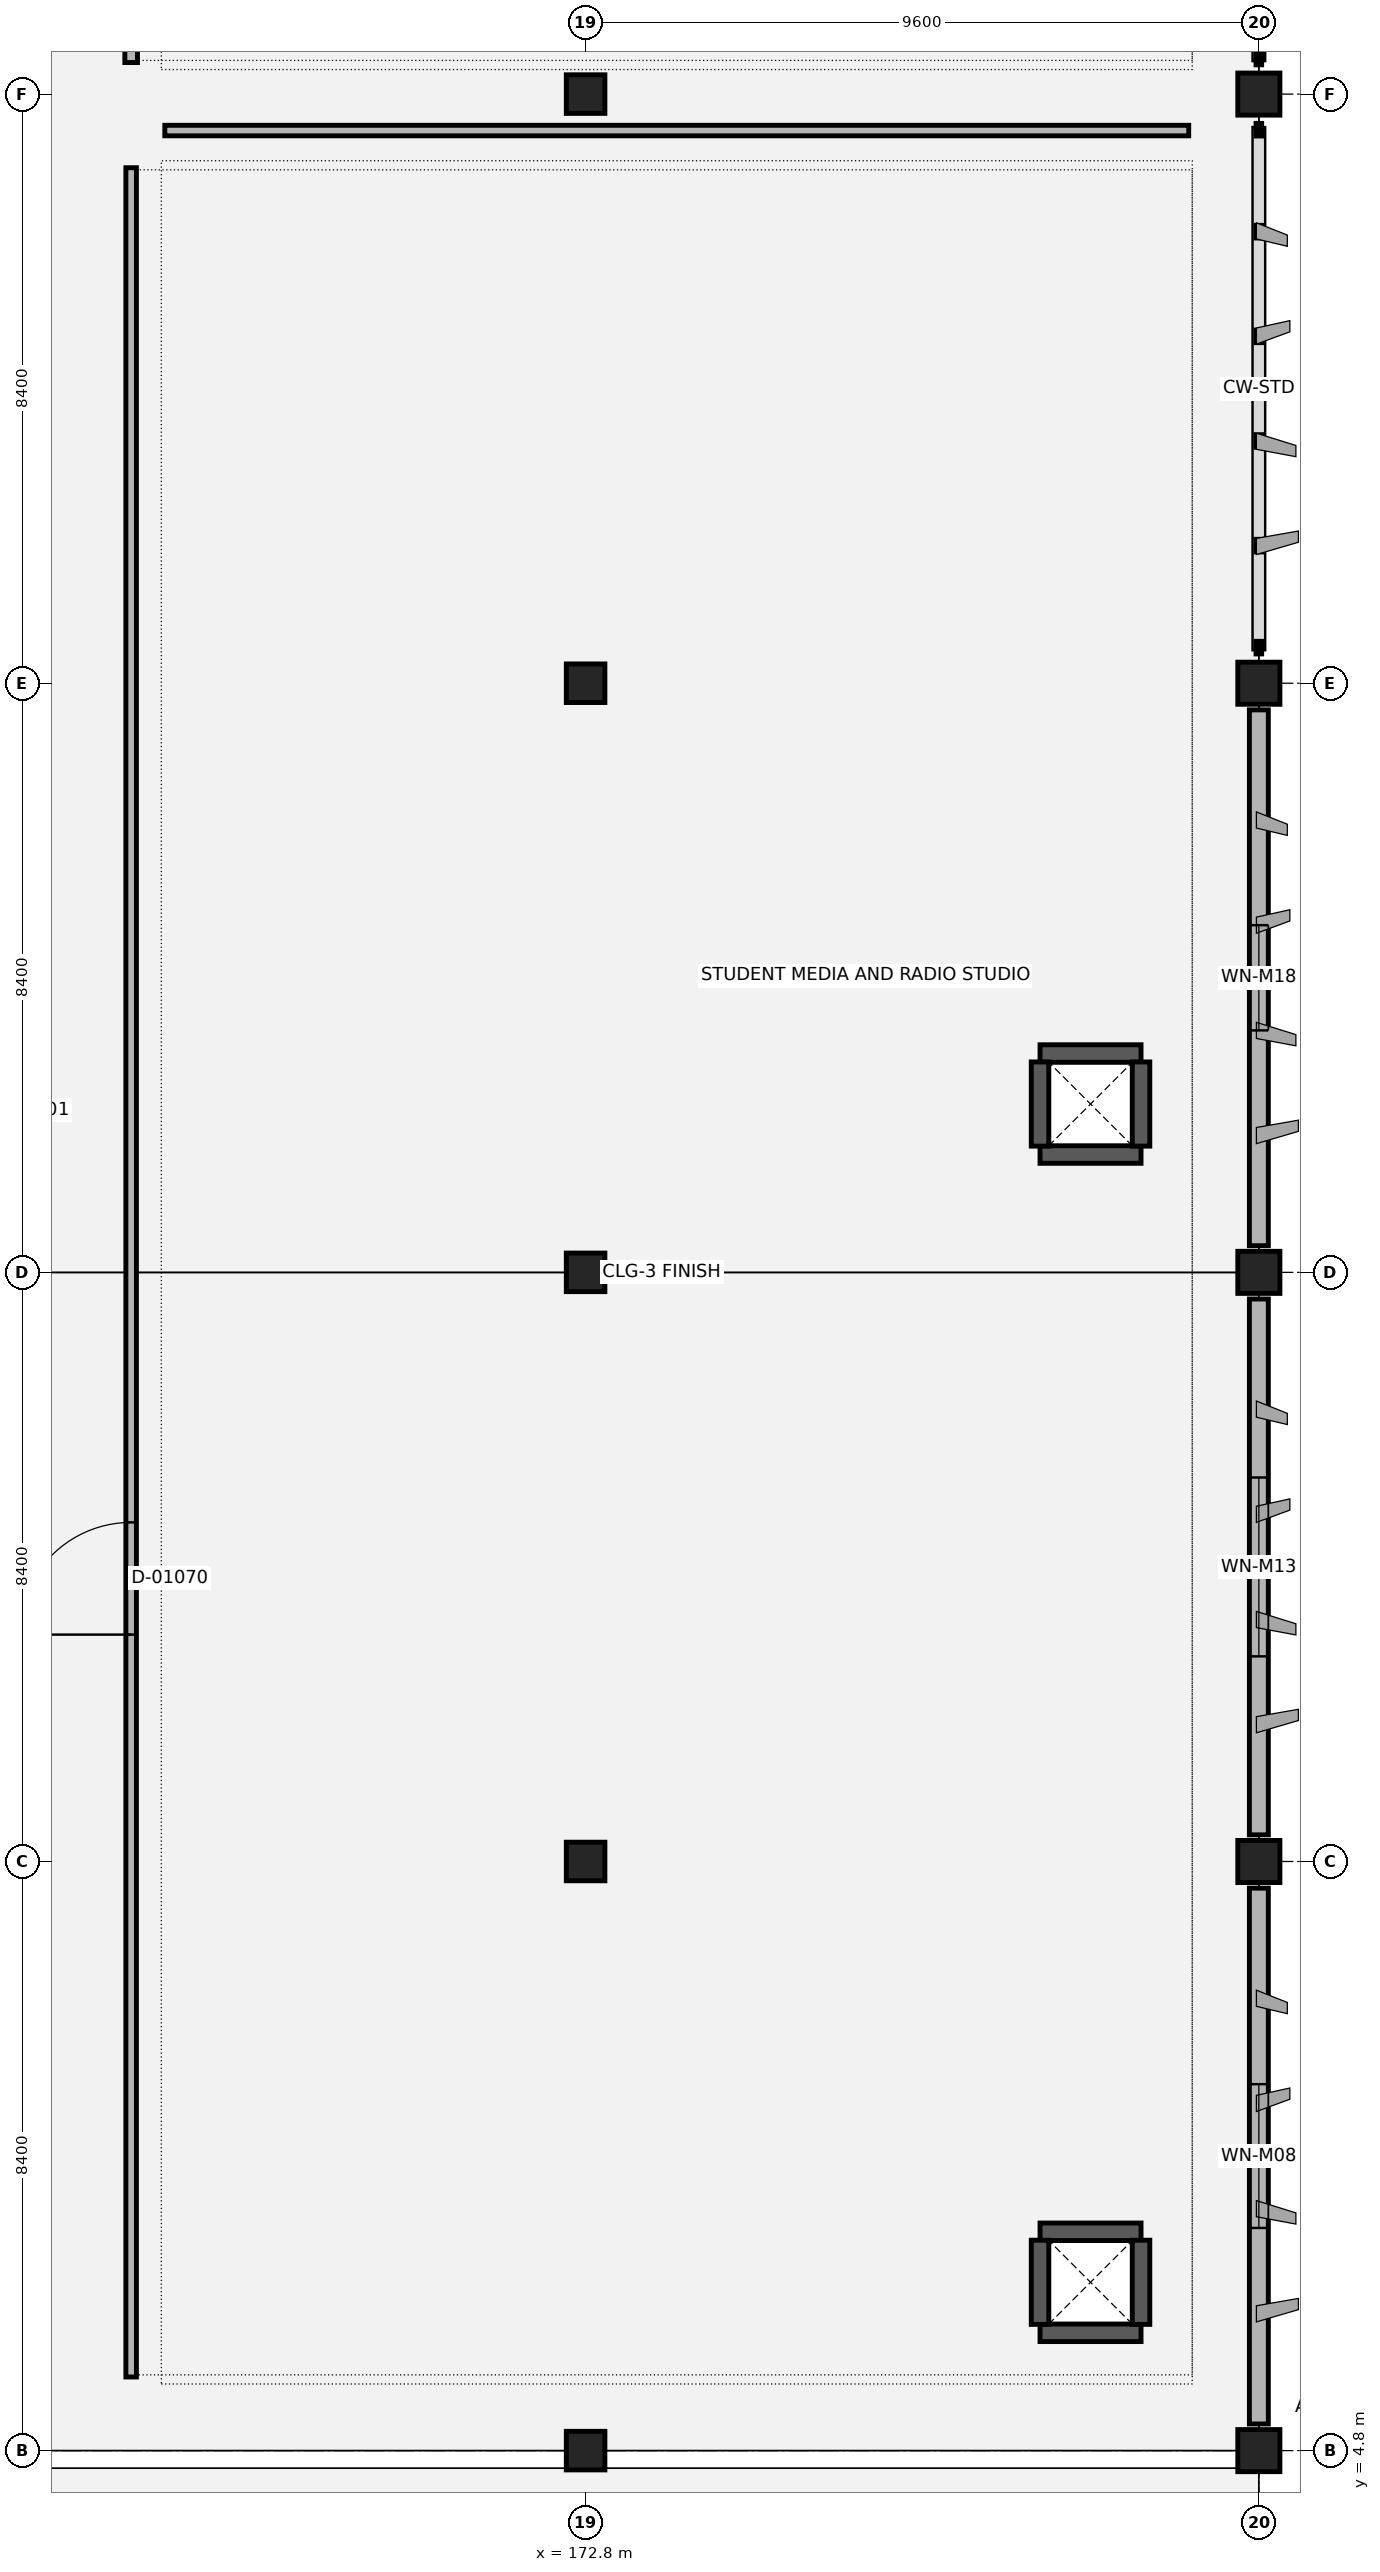
"""IFC4 building model, lengths in metres.
Left out: names, types, materials, properties, quantities, classifications, styles, units other than length and angle.
Written with IfcOpenShell. Run it as: python <this file> out.ifc"""

import sys

from ifc_helpers import new_model, si_unit, direction, frame, frame_2d, origin, origin_2d, place, context, subcontext, project, spatial, rectangle, extrude, element, fill, save


model = new_model("IFC4")
c1 = context("Model", 3, precision=1e-05, world=origin(), true_north=direction((0.0, 1.0)))
c2 = subcontext(c1, "Body", "Model", "MODEL_VIEW")
j1 = project(units=[si_unit("LENGTHUNIT", "METRE"), si_unit("PLANEANGLEUNIT", "RADIAN")], contexts=[c1])
p1 = place(None, origin())
s1 = spatial("IfcSite", under=j1, at=p1, CompositionType="ELEMENT")
p2 = place(p1, origin())
s2 = spatial("IfcBuilding", under=s1, at=p2, CompositionType="ELEMENT")
p3 = place(p2, frame((0.0, 0.0, 5.4)))
s3 = spatial("IfcBuildingStorey", under=s2, at=p3, CompositionType="ELEMENT", Elevation=5.4)
for number, where, z_axis, x_axis in (
    (1, (172.8, 4.8, 0.0), (0.0, 0.0, 1.0), (1.0, 0.0, 0.0)),
    (2, (172.8, 13.2, 0.0), (0.0, 0.0, 1.0), (1.0, 0.0, 0.0)),
    (3, (172.8, 21.6, 0.0), (0.0, 0.0, 1.0), (1.0, 0.0, 0.0)),
    (4, (172.8, 30.0, 0.0), (0.0, 0.0, 1.0), (1.0, 0.0, 0.0)),
    (5, (172.8, 38.4, 0.0), (0.0, 0.0, 1.0), (1.0, 0.0, 0.0)),
):
    element("IfcColumn", number, at=place(p3, frame(where, z_axis=z_axis, x_axis=x_axis)), inside=s3, PredefinedType="COLUMN", context=c2, shape_type="SweptSolid", body=[
        extrude(rectangle(XDim=0.55, YDim=0.55, at=origin_2d()), origin(), (0.0, 0.0, 1.0), 4.8),
    ])
for number, where, z_axis, x_axis in (
    (6, (182.4, 4.8, 0.0), (0.0, 0.0, 1.0), (1.0, 0.0, 0.0)),
    (7, (182.4, 13.2, 0.0), (0.0, 0.0, 1.0), (1.0, 0.0, 0.0)),
    (8, (182.4, 21.6, 0.0), (0.0, 0.0, 1.0), (1.0, 0.0, 0.0)),
    (9, (182.4, 30.0, 0.0), (0.0, 0.0, 1.0), (1.0, 0.0, 0.0)),
    (10, (182.4, 38.4, 0.0), (0.0, 0.0, 1.0), (1.0, 0.0, 0.0)),
):
    element("IfcColumn", number, at=place(p3, frame(where, z_axis=z_axis, x_axis=x_axis)), inside=s3, PredefinedType="COLUMN", context=c2, shape_type="SweptSolid", body=[
        extrude(rectangle(XDim=0.6, YDim=0.6, at=origin_2d()), origin(), (0.0, 0.0, 1.0), 4.8),
    ])
for number, where, z_axis, x_axis in (
    (11, (179.28, 6.48, 0.0), (0.0, 0.0, 1.0), (1.0, 0.0, 0.0)),
    (12, (179.28, 7.92, 0.0), (0.0, 0.0, 1.0), (1.0, 0.0, 0.0)),
):
    element("IfcWall", number, at=place(p3, frame(where, z_axis=z_axis, x_axis=x_axis)), inside=s3, PredefinedType="SHEAR", context=c2, shape_type="SweptSolid", body=[
        extrude(rectangle(XDim=1.44, YDim=0.25, at=frame_2d((0.72, 0.0))), origin(), (0.0, 0.0, 1.0), 3.6),
    ])
for number, where, z_axis, x_axis in (
    (13, (179.28, 6.6, 0.0), (0.0, 0.0, 1.0), (0.0, 1.0, 0.0)),
    (14, (180.72, 6.6, 0.0), (0.0, 0.0, 1.0), (0.0, 1.0, 0.0)),
):
    element("IfcWall", number, at=place(p3, frame(where, z_axis=z_axis, x_axis=x_axis)), inside=s3, PredefinedType="SHEAR", context=c2, shape_type="SweptSolid", body=[
        extrude(rectangle(XDim=1.2, YDim=0.25, at=frame_2d((0.6, 0.0))), origin(), (0.0, 0.0, 1.0), 3.6),
    ])
for number, where, z_axis, x_axis in (
    (15, (179.28, 23.28, 0.0), (0.0, 0.0, 1.0), (1.0, 0.0, 0.0)),
    (16, (179.28, 24.72, 0.0), (0.0, 0.0, 1.0), (1.0, 0.0, 0.0)),
):
    element("IfcWall", number, at=place(p3, frame(where, z_axis=z_axis, x_axis=x_axis)), inside=s3, PredefinedType="SHEAR", context=c2, shape_type="SweptSolid", body=[
        extrude(rectangle(XDim=1.44, YDim=0.25, at=frame_2d((0.72, 0.0))), origin(), (0.0, 0.0, 1.0), 3.6),
    ])
for number, where, z_axis, x_axis in (
    (17, (179.28, 23.4, 0.0), (0.0, 0.0, 1.0), (0.0, 1.0, 0.0)),
    (18, (180.72, 23.4, 0.0), (0.0, 0.0, 1.0), (0.0, 1.0, 0.0)),
):
    element("IfcWall", number, at=place(p3, frame(where, z_axis=z_axis, x_axis=x_axis)), inside=s3, PredefinedType="SHEAR", context=c2, shape_type="SweptSolid", body=[
        extrude(rectangle(XDim=1.2, YDim=0.25, at=frame_2d((0.6, 0.0))), origin(), (0.0, 0.0, 1.0), 3.6),
    ])
p4 = place(p3, frame((182.4, 5.18, 0.0), z_axis=(0.0, 0.0, 1.0), x_axis=(0.0, 1.0, 0.0)))
e19 = element("IfcWall", 19, at=p4, inside=s3, PredefinedType="SOLIDWALL", context=c2, shape_type="SweptSolid", body=[
    extrude(rectangle(XDim=7.64, YDim=0.27, at=frame_2d((3.82, 0.0))), origin(), (0.0, 0.0, 1.0), 3.28),
])
p5 = place(p4, frame((2.795, 0.0, 0.9)))
e20 = element("IfcOpeningElement", 20, at=p5, cuts=e19, PredefinedType="OPENING", context=c2, shape_type="SweptSolid", body=[
    extrude(rectangle(XDim=2.05, YDim=1.6, at=frame_2d((1.025, 0.8))), frame((0.0, 0.145, 0.0), z_axis=(0.0, -1.0, 0.0), x_axis=(1.0, 0.0, 0.0)), (0.0, 0.0, 1.0), 0.29),
])
p6 = place(p3, frame((182.4, 13.58, 0.0), z_axis=(0.0, 0.0, 1.0), x_axis=(0.0, 1.0, 0.0)))
e21 = element("IfcWall", 21, at=p6, inside=s3, PredefinedType="SOLIDWALL", context=c2, shape_type="SweptSolid", body=[
    extrude(rectangle(XDim=7.64, YDim=0.27, at=frame_2d((3.82, 0.0))), origin(), (0.0, 0.0, 1.0), 3.28),
])
p7 = place(p6, frame((2.545, 0.0, 0.9)))
e22 = element("IfcOpeningElement", 22, at=p7, cuts=e21, PredefinedType="OPENING", context=c2, shape_type="SweptSolid", body=[
    extrude(rectangle(XDim=2.55, YDim=1.75, at=frame_2d((1.275, 0.875))), frame((0.0, 0.145, 0.0), z_axis=(0.0, -1.0, 0.0), x_axis=(1.0, 0.0, 0.0)), (0.0, 0.0, 1.0), 0.29),
])
p8 = place(p3, frame((182.4, 21.98, 0.0), z_axis=(0.0, 0.0, 1.0), x_axis=(0.0, 1.0, 0.0)))
e23 = element("IfcWall", 23, at=p8, inside=s3, PredefinedType="SOLIDWALL", context=c2, shape_type="SweptSolid", body=[
    extrude(rectangle(XDim=7.64, YDim=0.27, at=frame_2d((3.82, 0.0))), origin(), (0.0, 0.0, 1.0), 3.28),
])
p9 = place(p8, frame((3.07, 0.0, 0.9)))
e24 = element("IfcOpeningElement", 24, at=p9, cuts=e23, PredefinedType="OPENING", context=c2, shape_type="SweptSolid", body=[
    extrude(rectangle(XDim=1.5, YDim=1.4, at=frame_2d((0.75, 0.7))), frame((0.0, 0.145, 0.0), z_axis=(0.0, -1.0, 0.0), x_axis=(1.0, 0.0, 0.0)), (0.0, 0.0, 1.0), 0.29),
])
p10 = place(p3, frame((166.32, 5.85, 0.0), z_axis=(0.0, 0.0, 1.0), x_axis=(0.0, 1.0, 0.0)))
e25 = element("IfcWall", 25, at=p10, inside=s3, PredefinedType="PARTITIONING", context=c2, shape_type="SweptSolid", body=[
    extrude(rectangle(XDim=31.5, YDim=0.15, at=frame_2d((15.75, 0.0))), origin(), (0.0, 0.0, 1.0), 3.26),
])
p11 = place(p10, frame((10.585, 0.0, 0.0)))
e26 = element("IfcOpeningElement", 26, at=p11, cuts=e25, PredefinedType="OPENING", context=c2, shape_type="SweptSolid", body=[
    extrude(rectangle(XDim=1.6, YDim=2.15, at=frame_2d((0.8, 1.075))), frame((0.0, 0.085, 0.0), z_axis=(0.0, -1.0, 0.0), x_axis=(1.0, 0.0, 0.0)), (0.0, 0.0, 1.0), 0.17),
])
p12 = place(p3, frame((166.8, 37.88, 0.0), z_axis=(0.0, 0.0, 1.0), x_axis=(1.0, 0.0, 0.0)))
e27 = element("IfcWall", 27, at=p12, inside=s3, PredefinedType="PARTITIONING", context=c2, shape_type="SweptSolid", body=[
    extrude(rectangle(XDim=14.6, YDim=0.15, at=frame_2d((7.3, 0.0))), origin(), (0.0, 0.0, 1.0), 3.26),
])
p13 = place(p3, frame((166.32, 38.85, 0.0), z_axis=(0.0, 0.0, 1.0), x_axis=(0.0, 1.0, 0.0)))
e28 = element("IfcWall", 28, at=p13, inside=s3, PredefinedType="PARTITIONING", context=c2, shape_type="SweptSolid", body=[
    extrude(rectangle(XDim=28.5, YDim=0.18, at=frame_2d((14.25, 0.0))), origin(), (0.0, 0.0, 1.0), 3.26),
])
p14 = place(p13, frame((15.97, 0.0, 0.0)))
e29 = element("IfcOpeningElement", 29, at=p14, cuts=e28, PredefinedType="OPENING", context=c2, shape_type="SweptSolid", body=[
    extrude(rectangle(XDim=1.75, YDim=2.15, at=frame_2d((0.875, 1.075))), frame((0.0, 0.1, 0.0), z_axis=(0.0, -1.0, 0.0), x_axis=(1.0, 0.0, 0.0)), (0.0, 0.0, 1.0), 0.2),
])
p15 = place(p5, origin())
e30 = element("IfcWindow", 30, at=p15, inside=s3, PartitioningType="SINGLE_PANEL", PredefinedType="WINDOW", context=c2, shape_type="SweptSolid", body=[
    extrude(rectangle(XDim=2.05, YDim=1.6, at=frame_2d((1.025, 0.8))), frame((0.0, 0.03, 0.0), z_axis=(0.0, -1.0, 0.0), x_axis=(1.0, 0.0, 0.0)), (0.0, 0.0, 1.0), 0.06),
])
fill(e20, e30)
p16 = place(p7, origin())
e31 = element("IfcWindow", 31, at=p16, inside=s3, PartitioningType="SINGLE_PANEL", PredefinedType="WINDOW", context=c2, shape_type="SweptSolid", body=[
    extrude(rectangle(XDim=2.55, YDim=1.75, at=frame_2d((1.275, 0.875))), frame((0.0, 0.03, 0.0), z_axis=(0.0, -1.0, 0.0), x_axis=(1.0, 0.0, 0.0)), (0.0, 0.0, 1.0), 0.06),
])
fill(e22, e31)
p17 = place(p9, origin())
e32 = element("IfcWindow", 32, at=p17, inside=s3, PartitioningType="SINGLE_PANEL", PredefinedType="WINDOW", context=c2, shape_type="SweptSolid", body=[
    extrude(rectangle(XDim=1.5, YDim=1.4, at=frame_2d((0.75, 0.7))), frame((0.0, 0.03, 0.0), z_axis=(0.0, -1.0, 0.0), x_axis=(1.0, 0.0, 0.0)), (0.0, 0.0, 1.0), 0.06),
])
fill(e24, e32)
p18 = place(p11, origin())
e33 = element("IfcDoor", 33, at=p18, inside=s3, OperationType="SINGLE_SWING_LEFT", PredefinedType="DOOR", context=c2, shape_type="SweptSolid", body=[
    extrude(rectangle(XDim=1.6, YDim=2.15, at=frame_2d((0.8, 1.075))), frame((0.0, 0.025, 0.0), z_axis=(0.0, -1.0, 0.0), x_axis=(1.0, 0.0, 0.0)), (0.0, 0.0, 1.0), 0.05),
])
fill(e26, e33)
save(model, sys.argv[1])
